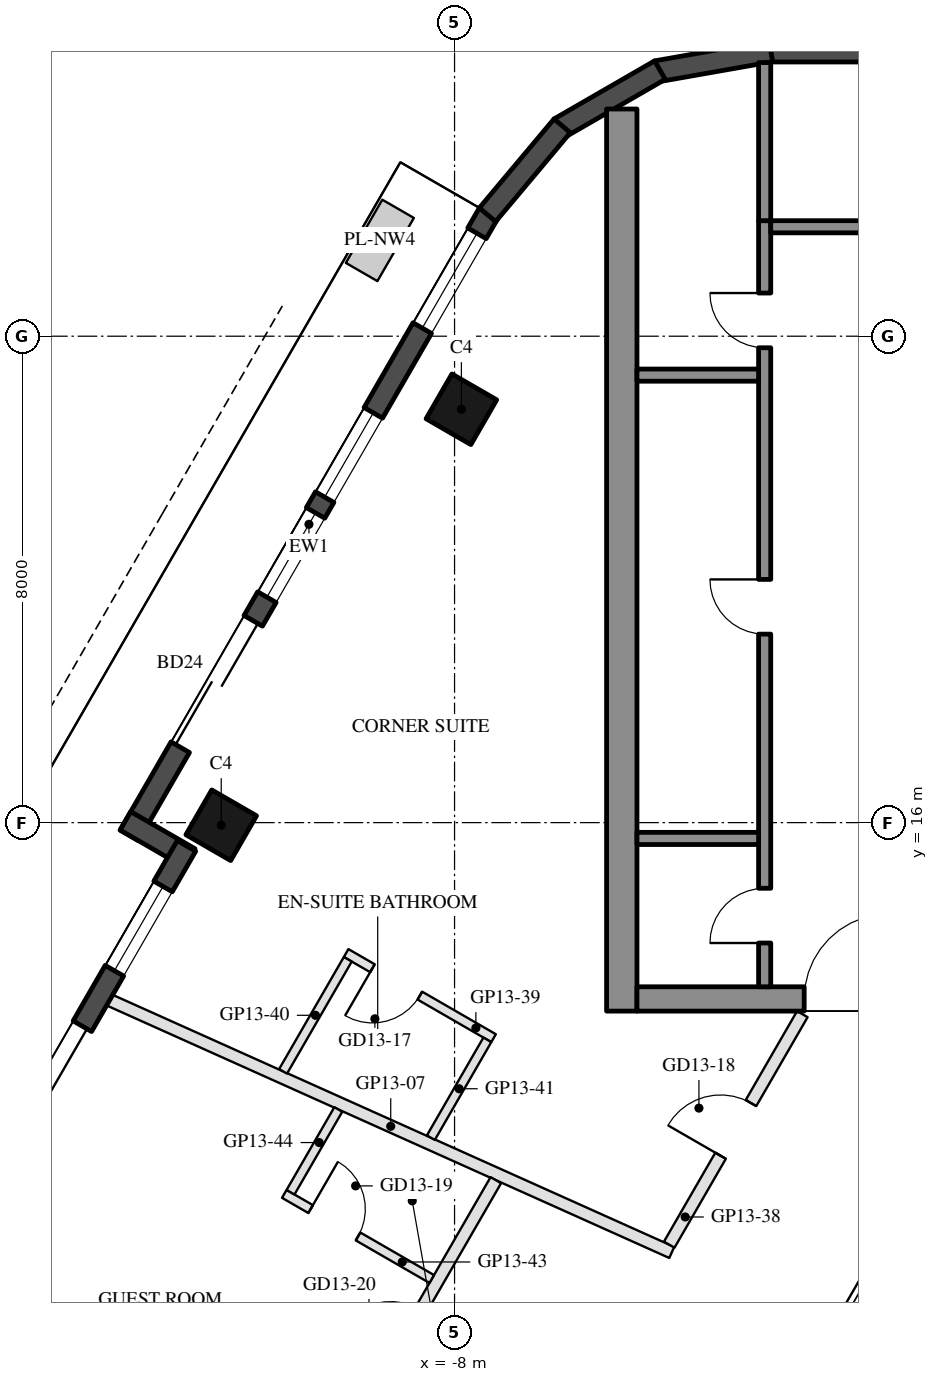
"""IFC4 building model, lengths in metres.
Left out: names, types, materials, properties, quantities, classifications, styles, units other than length and angle.
Written with IfcOpenShell. Run it as: python <this file> out.ifc"""

import sys

from ifc_helpers import new_model, si_unit, direction, frame, frame_2d, origin, origin_2d, place, context, subcontext, project, spatial, rectangle, hollow_rectangle, extrude, element, fill, save


model = new_model("IFC4")
c1 = context("Model", 3, precision=1e-05, world=origin(), true_north=direction((0.0, 1.0)))
c2 = subcontext(c1, "Body", "Model", "MODEL_VIEW")
j1 = project(units=[si_unit("LENGTHUNIT", "METRE"), si_unit("PLANEANGLEUNIT", "RADIAN")], contexts=[c1])
p1 = place(None, origin())
s1 = spatial("IfcSite", under=j1, at=p1, CompositionType="ELEMENT")
p2 = place(p1, origin())
s2 = spatial("IfcBuilding", under=s1, at=p2, CompositionType="ELEMENT")
p3 = place(p2, frame((0.0, 0.0, 154.0)))
s3 = spatial("IfcBuildingStorey", under=s2, at=p3, CompositionType="ELEMENT", Elevation=154.0)
for number, where, z_axis, x_axis in (
    (1, (-7.888, 22.798, 0.0), (0.0, 0.0, 1.0), (0.5, 0.866, 0.0)),
    (2, (-11.838, 15.957, 0.0), (0.0, 0.0, 1.0), (0.5, 0.866, 0.0)),
):
    element("IfcColumn", number, at=place(p3, frame(where, z_axis=z_axis, x_axis=x_axis)), inside=s3, PredefinedType="COLUMN", context=c2, shape_type="SweptSolid", body=[
        extrude(hollow_rectangle(XDim=0.85, YDim=0.85, WallThickness=0.04, at=origin_2d()), origin(), (0.0, 0.0, 1.0), 3.7),
    ])
p4 = place(p3, frame((-7.441, 26.022, 0.0), z_axis=(0.0, 0.0, 1.0), x_axis=(-0.499992533062, -0.86602971478, 0.0)))
e3 = element("IfcWall", 3, at=p4, inside=s3, PredefinedType="SOLIDWALL", context=c2, shape_type="SweptSolid", body=[
    extrude(rectangle(XDim=11.816, YDim=0.35, at=frame_2d((5.908, 0.0))), origin(), (0.0, 0.0, 1.0), 3.55),
])
p5 = place(p4, frame((0.381, 0.0, 0.3)))
e4 = element("IfcOpeningElement", 4, at=p5, cuts=e3, PredefinedType="OPENING", context=c2, shape_type="SweptSolid", body=[
    extrude(rectangle(XDim=1.8, YDim=2.65, at=frame_2d((0.9, 1.325))), frame((0.0, 0.185, 0.0), z_axis=(0.0, -1.0, 0.0), x_axis=(1.0, 0.0, 0.0)), (0.0, 0.0, 1.0), 0.37),
])
p6 = place(p4, frame((7.74, 0.0, 0.0)))
e5 = element("IfcOpeningElement", 5, at=p6, cuts=e3, PredefinedType="OPENING", context=c2, shape_type="SweptSolid", body=[
    extrude(rectangle(XDim=2.4, YDim=2.4, at=frame_2d((1.2, 1.2))), frame((0.0, 0.185, 0.0), z_axis=(0.0, -1.0, 0.0), x_axis=(1.0, 0.0, 0.0)), (0.0, 0.0, 1.0), 0.37),
])
p7 = place(p4, frame((3.791, 0.0, 0.3)))
e6 = element("IfcOpeningElement", 6, at=p7, cuts=e3, PredefinedType="OPENING", context=c2, shape_type="SweptSolid", body=[
    extrude(rectangle(XDim=1.6, YDim=2.65, at=frame_2d((0.8, 1.325))), frame((0.0, 0.185, 0.0), z_axis=(0.0, -1.0, 0.0), x_axis=(1.0, 0.0, 0.0)), (0.0, 0.0, 1.0), 0.37),
])
p8 = place(p4, frame((5.691, 0.0, 0.3)))
e7 = element("IfcOpeningElement", 7, at=p8, cuts=e3, PredefinedType="OPENING", context=c2, shape_type="SweptSolid", body=[
    extrude(rectangle(XDim=1.6, YDim=2.65, at=frame_2d((0.8, 1.325))), frame((0.0, 0.185, 0.0), z_axis=(0.0, -1.0, 0.0), x_axis=(1.0, 0.0, 0.0)), (0.0, 0.0, 1.0), 0.37),
])
p9 = place(p3, frame((-13.413, 16.029, 0.0), z_axis=(0.0, 0.0, 1.0), x_axis=(0.866005645448, -0.500034220881, 0.0)))
e8 = element("IfcWall", 8, at=p9, inside=s3, PredefinedType="SOLIDWALL", context=c2, shape_type="SweptSolid", body=[
    extrude(rectangle(XDim=1.22, YDim=0.35, at=frame_2d((0.61, 0.0))), origin(), (0.0, 0.0, 1.0), 3.55),
])
p10 = place(p3, frame((-12.409, 15.617, 0.0), z_axis=(0.0, 0.0, 1.0), x_axis=(-0.500003597184, -0.866023326939, 0.0)))
e9 = element("IfcWall", 9, at=p10, inside=s3, PredefinedType="SOLIDWALL", context=c2, shape_type="SweptSolid", body=[
    extrude(rectangle(XDim=6.74, YDim=0.35, at=frame_2d((3.37, 0.0))), origin(), (0.0, 0.0, 1.0), 3.55),
])
p11 = place(p10, frame((0.77, 0.0, 0.3)))
e10 = element("IfcOpeningElement", 10, at=p11, cuts=e9, PredefinedType="OPENING", context=c2, shape_type="SweptSolid", body=[
    extrude(rectangle(XDim=1.6, YDim=2.65, at=frame_2d((0.8, 1.325))), frame((0.0, 0.185, 0.0), z_axis=(0.0, -1.0, 0.0), x_axis=(1.0, 0.0, 0.0)), (0.0, 0.0, 1.0), 0.37),
])
p12 = place(p10, frame((3.424, 0.0, 0.0)))
e11 = element("IfcOpeningElement", 11, at=p12, cuts=e9, PredefinedType="OPENING", context=c2, shape_type="SweptSolid", body=[
    extrude(rectangle(XDim=2.4, YDim=2.4, at=frame_2d((1.2, 1.2))), frame((0.0, 0.185, 0.0), z_axis=(0.0, -1.0, 0.0), x_axis=(1.0, 0.0, 0.0)), (0.0, 0.0, 1.0), 0.37),
])
p13 = place(p3, frame((2.829, 28.685, 0.0), z_axis=(0.0, 0.0, 1.0), x_axis=(-1.0, 0.0, 0.0)))
e12 = element("IfcWall", 12, at=p13, inside=s3, PredefinedType="SOLIDWALL", context=c2, shape_type="SweptSolid", body=[
    extrude(rectangle(XDim=5.658, YDim=0.35, at=frame_2d((2.829, 0.0))), origin(), (0.0, 0.0, 1.0), 3.55),
])
for number, where, z_axis, x_axis in (
    (13, (-2.799, 28.688, 0.0), (0.0, 0.0, 1.0), (-0.985, -0.174, 0.0)),
    (14, (-4.623, 28.377, 0.0), (0.0, 0.0, 1.0), (-0.866, -0.5, 0.0)),
):
    element("IfcWall", number, at=place(p3, frame(where, z_axis=z_axis, x_axis=x_axis)), inside=s3, PredefinedType="SOLIDWALL", context=c2, shape_type="SweptSolid", body=[
        extrude(rectangle(XDim=1.91, YDim=0.35, at=frame_2d((0.955, 0.0))), origin(), (0.0, 0.0, 1.0), 3.55),
    ])
p14 = place(p3, frame((-6.23, 27.461, 0.0), z_axis=(0.0, 0.0, 1.0), x_axis=(-0.642808304945, -0.766027077259, 0.0)))
e15 = element("IfcWall", 15, at=p14, inside=s3, PredefinedType="SOLIDWALL", context=c2, shape_type="SweptSolid", body=[
    extrude(rectangle(XDim=1.91, YDim=0.35, at=frame_2d((0.955, 0.0))), origin(), (0.0, 0.0, 1.0), 3.55),
])
p15 = place(p3, frame((-5.25, 12.9, 0.0), z_axis=(0.0, 0.0, 1.0), x_axis=(0.0, 1.0, 0.0)))
e16 = element("IfcWall", 16, at=p15, inside=s3, PredefinedType="SHEAR", context=c2, shape_type="SweptSolid", body=[
    extrude(rectangle(XDim=14.837, YDim=0.5, at=frame_2d((7.418, 0.0))), origin(), (0.0, 0.0, 1.0), 3.5),
])
p16 = place(p3, frame((5.0, 13.1, 0.0), z_axis=(0.0, 0.0, 1.0), x_axis=(-1.0, 0.0, 0.0)))
e17 = element("IfcWall", 17, at=p16, inside=s3, PredefinedType="SHEAR", context=c2, shape_type="SweptSolid", body=[
    extrude(rectangle(XDim=10.0, YDim=0.4, at=frame_2d((5.0, 0.0))), origin(), (0.0, 0.0, 1.0), 3.5),
])
p17 = place(p16, frame((3.55, 0.0, 0.0)))
e18 = element("IfcOpeningElement", 18, at=p17, cuts=e17, PredefinedType="OPENING", context=c2, shape_type="SweptSolid", body=[
    extrude(rectangle(XDim=1.1, YDim=2.1, at=frame_2d((0.55, 1.05))), frame((0.0, 0.21, 0.0), z_axis=(0.0, -1.0, 0.0), x_axis=(1.0, 0.0, 0.0)), (0.0, 0.0, 1.0), 0.42),
])
p18 = place(p16, frame((5.85, 0.0, 0.0)))
e19 = element("IfcOpeningElement", 19, at=p18, cuts=e17, PredefinedType="OPENING", context=c2, shape_type="SweptSolid", body=[
    extrude(rectangle(XDim=1.4, YDim=2.1, at=frame_2d((0.7, 1.05))), frame((0.0, 0.21, 0.0), z_axis=(0.0, -1.0, 0.0), x_axis=(1.0, 0.0, 0.0)), (0.0, 0.0, 1.0), 0.42),
])
p19 = place(p3, frame((-2.9, 13.3, 0.0), z_axis=(0.0, 0.0, 1.0), x_axis=(0.0, 1.0, 0.0)))
e20 = element("IfcWall", 20, at=p19, inside=s3, PredefinedType="SHEAR", context=c2, shape_type="SweptSolid", body=[
    extrude(rectangle(XDim=12.6, YDim=0.2, at=frame_2d((6.3, 0.0))), origin(), (0.0, 0.0, 1.0), 3.5),
])
p20 = place(p19, frame((0.72, 0.0, 0.0)))
e21 = element("IfcOpeningElement", 21, at=p20, cuts=e20, PredefinedType="OPENING", context=c2, shape_type="SweptSolid", body=[
    extrude(rectangle(XDim=0.9, YDim=2.1, at=frame_2d((0.45, 1.05))), frame((0.0, 0.11, 0.0), z_axis=(0.0, -1.0, 0.0), x_axis=(1.0, 0.0, 0.0)), (0.0, 0.0, 1.0), 0.22),
])
p21 = place(p19, frame((5.8, 0.0, 0.0)))
e22 = element("IfcOpeningElement", 22, at=p21, cuts=e20, PredefinedType="OPENING", context=c2, shape_type="SweptSolid", body=[
    extrude(rectangle(XDim=0.9, YDim=2.1, at=frame_2d((0.45, 1.05))), frame((0.0, 0.11, 0.0), z_axis=(0.0, -1.0, 0.0), x_axis=(1.0, 0.0, 0.0)), (0.0, 0.0, 1.0), 0.22),
])
p22 = place(p19, frame((10.51, 0.0, 0.0)))
e23 = element("IfcOpeningElement", 23, at=p22, cuts=e20, PredefinedType="OPENING", context=c2, shape_type="SweptSolid", body=[
    extrude(rectangle(XDim=0.9, YDim=2.1, at=frame_2d((0.45, 1.05))), frame((0.0, 0.11, 0.0), z_axis=(0.0, -1.0, 0.0), x_axis=(1.0, 0.0, 0.0)), (0.0, 0.0, 1.0), 0.22),
])
p23 = place(p3, frame((-0.4, 25.8, 0.0), z_axis=(0.0, 0.0, 1.0), x_axis=(-1.0, 0.0, 0.0)))
e24 = element("IfcWall", 24, at=p23, inside=s3, PredefinedType="SHEAR", context=c2, shape_type="SweptSolid", body=[
    extrude(rectangle(XDim=2.4, YDim=0.2, at=frame_2d((1.2, 0.0))), origin(), (0.0, 0.0, 1.0), 3.5),
])
for number, where, z_axis, x_axis in (
    (25, (-3.0, 15.74, 0.0), (0.0, 0.0, 1.0), (-1.0, 0.0, 0.0)),
    (26, (-3.0, 23.36, 0.0), (0.0, 0.0, 1.0), (-1.0, 0.0, 0.0)),
):
    element("IfcWall", number, at=place(p3, frame(where, z_axis=z_axis, x_axis=x_axis)), inside=s3, PredefinedType="SHEAR", context=c2, shape_type="SweptSolid", body=[
        extrude(rectangle(XDim=2.0, YDim=0.2, at=frame_2d((1.0, 0.0))), origin(), (0.0, 0.0, 1.0), 3.5),
    ])
p24 = place(p3, frame((-2.9, 25.9, 0.0), z_axis=(0.0, 0.0, 1.0), x_axis=(0.0, 1.0, 0.0)))
e27 = element("IfcWall", 27, at=p24, inside=s3, PredefinedType="SHEAR", context=c2, shape_type="SweptSolid", body=[
    extrude(rectangle(XDim=2.6, YDim=0.2, at=frame_2d((1.3, 0.0))), origin(), (0.0, 0.0, 1.0), 3.5),
])
p25 = place(p3, frame((-13.672, 13.08, 0.0), z_axis=(0.0, 0.0, 1.0), x_axis=(0.912311972773, -0.409495866077, 0.0)))
e28 = element("IfcWall", 28, at=p25, inside=s3, PredefinedType="PARTITIONING", context=c2, shape_type="SweptSolid", body=[
    extrude(rectangle(XDim=10.132, YDim=0.2, at=frame_2d((5.066, 0.0))), origin(), (0.0, 0.0, 1.0), 3.06),
])
p26 = place(p3, frame((-4.469, 9.059, 0.0), z_axis=(0.0, 0.0, 1.0), x_axis=(0.499996027077, 0.86602769754, 0.0)))
e29 = element("IfcWall", 29, at=p26, inside=s3, PredefinedType="PARTITIONING", context=c2, shape_type="SweptSolid", body=[
    extrude(rectangle(XDim=4.377, YDim=0.2, at=frame_2d((2.189, 0.0))), origin(), (0.0, 0.0, 1.0), 2.95),
])
p27 = place(p26, frame((1.689, 0.0, 0.0)))
e30 = element("IfcOpeningElement", 30, at=p27, cuts=e29, PredefinedType="OPENING", context=c2, shape_type="SweptSolid", body=[
    extrude(rectangle(XDim=1.0, YDim=2.1, at=frame_2d((0.5, 1.05))), frame((0.0, 0.11, 0.0), z_axis=(0.0, -1.0, 0.0), x_axis=(1.0, 0.0, 0.0)), (0.0, 0.0, 1.0), 0.22),
])
p28 = place(p3, frame((-7.358, 12.455, 0.0), z_axis=(0.0, 0.0, 1.0), x_axis=(-0.866034573852, 0.49998411664, 0.0)))
e31 = element("IfcWall", 31, at=p28, inside=s3, PredefinedType="PARTITIONING", context=c2, shape_type="SweptSolid", body=[
    extrude(rectangle(XDim=2.8, YDim=0.15, at=frame_2d((1.4, 0.0))), origin(), (0.0, 0.0, 1.0), 3.55),
])
p29 = place(p28, frame((1.4, 0.0, 0.0)))
e32 = element("IfcOpeningElement", 32, at=p29, cuts=e31, PredefinedType="OPENING", context=c2, shape_type="SweptSolid", body=[
    extrude(rectangle(XDim=0.9, YDim=2.1, at=frame_2d((0.45, 1.05))), frame((0.0, 0.085, 0.0), z_axis=(0.0, -1.0, 0.0), x_axis=(1.0, 0.0, 0.0)), (0.0, 0.0, 1.0), 0.17),
])
p30 = place(p3, frame((-9.756, 13.752, 0.0), z_axis=(0.0, 0.0, 1.0), x_axis=(-0.50001378257, -0.866017446268, 0.0)))
e33 = element("IfcWall", 33, at=p30, inside=s3, PredefinedType="PARTITIONING", context=c2, shape_type="SweptSolid", body=[
    extrude(rectangle(XDim=2.128, YDim=0.15, at=frame_2d((1.064, 0.0))), origin(), (0.0, 0.0, 1.0), 3.55),
])
p31 = place(p3, frame((-7.461, 12.427, 0.0), z_axis=(0.0, 0.0, 1.0), x_axis=(-0.500025795397, -0.866010510293, 0.0)))
e34 = element("IfcWall", 34, at=p31, inside=s3, PredefinedType="PARTITIONING", context=c2, shape_type="SweptSolid", body=[
    extrude(rectangle(XDim=1.858, YDim=0.15, at=frame_2d((0.929, 0.0))), origin(), (0.0, 0.0, 1.0), 3.55),
])
p32 = place(p3, frame((-10.811, 4.075, 0.0), z_axis=(0.0, 0.0, 1.0), x_axis=(0.500006032813, 0.86602192071, 0.0)))
e35 = element("IfcWall", 35, at=p32, inside=s3, PredefinedType="PARTITIONING", context=c2, shape_type="SweptSolid", body=[
    extrude(rectangle(XDim=6.98, YDim=0.2, at=frame_2d((3.49, 0.0))), origin(), (0.0, 0.0, 1.0), 2.95),
])
p33 = place(p32, frame((3.52, 0.0, 0.0)))
e36 = element("IfcOpeningElement", 36, at=p33, cuts=e35, PredefinedType="OPENING", context=c2, shape_type="SweptSolid", body=[
    extrude(rectangle(XDim=1.0, YDim=2.1, at=frame_2d((0.5, 1.05))), frame((0.0, 0.11, 0.0), z_axis=(0.0, -1.0, 0.0), x_axis=(1.0, 0.0, 0.0)), (0.0, 0.0, 1.0), 0.22),
])
p34 = place(p3, frame((-10.8, 9.894, 0.0), z_axis=(0.0, 0.0, 1.0), x_axis=(0.866056369097, -0.49994636267, 0.0)))
e37 = element("IfcWall", 37, at=p34, inside=s3, PredefinedType="PARTITIONING", context=c2, shape_type="SweptSolid", body=[
    extrude(rectangle(XDim=2.8, YDim=0.15, at=frame_2d((1.4, 0.0))), origin(), (0.0, 0.0, 1.0), 3.55),
])
p35 = place(p34, frame((0.5, 0.0, 0.0)))
e38 = element("IfcOpeningElement", 38, at=p35, cuts=e37, PredefinedType="OPENING", context=c2, shape_type="SweptSolid", body=[
    extrude(rectangle(XDim=0.9, YDim=2.1, at=frame_2d((0.45, 1.05))), frame((0.0, 0.085, 0.0), z_axis=(0.0, -1.0, 0.0), x_axis=(1.0, 0.0, 0.0)), (0.0, 0.0, 1.0), 0.17),
])
p36 = place(p3, frame((-9.912, 11.283, 0.0), z_axis=(0.0, 0.0, 1.0), x_axis=(-0.499964459118, -0.86604592235, 0.0)))
e39 = element("IfcWall", 39, at=p36, inside=s3, PredefinedType="PARTITIONING", context=c2, shape_type="SweptSolid", body=[
    extrude(rectangle(XDim=1.572, YDim=0.15, at=frame_2d((0.786, 0.0))), origin(), (0.0, 0.0, 1.0), 2.95),
])
p37 = place(p5, origin())
e40 = element("IfcWindow", 40, at=p37, inside=s3, PartitioningType="SINGLE_PANEL", PredefinedType="WINDOW", context=c2, shape_type="SweptSolid", body=[
    extrude(rectangle(XDim=1.8, YDim=2.65, at=frame_2d((0.9, 1.325))), frame((0.0, 0.03, 0.0), z_axis=(0.0, -1.0, 0.0), x_axis=(1.0, 0.0, 0.0)), (0.0, 0.0, 1.0), 0.06),
])
fill(e4, e40)
p38 = place(p6, frame((2.4, 0.0, 0.0), z_axis=(0.0, 0.0, 1.0), x_axis=(-1.0, 0.0, 0.0)))
e41 = element("IfcDoor", 41, at=p38, inside=s3, OperationType="SLIDING_TO_LEFT", PredefinedType="DOOR", context=c2, shape_type="SweptSolid", body=[
    extrude(rectangle(XDim=2.4, YDim=2.4, at=frame_2d((1.2, 1.2))), frame((0.0, 0.025, 0.0), z_axis=(0.0, -1.0, 0.0), x_axis=(1.0, 0.0, 0.0)), (0.0, 0.0, 1.0), 0.05),
])
fill(e5, e41)
p39 = place(p7, origin())
e42 = element("IfcWindow", 42, at=p39, inside=s3, PartitioningType="SINGLE_PANEL", PredefinedType="WINDOW", context=c2, shape_type="SweptSolid", body=[
    extrude(rectangle(XDim=1.6, YDim=2.65, at=frame_2d((0.8, 1.325))), frame((0.0, 0.03, 0.0), z_axis=(0.0, -1.0, 0.0), x_axis=(1.0, 0.0, 0.0)), (0.0, 0.0, 1.0), 0.06),
])
fill(e6, e42)
p40 = place(p8, origin())
e43 = element("IfcWindow", 43, at=p40, inside=s3, PartitioningType="SINGLE_PANEL", PredefinedType="WINDOW", context=c2, shape_type="SweptSolid", body=[
    extrude(rectangle(XDim=1.6, YDim=2.65, at=frame_2d((0.8, 1.325))), frame((0.0, 0.03, 0.0), z_axis=(0.0, -1.0, 0.0), x_axis=(1.0, 0.0, 0.0)), (0.0, 0.0, 1.0), 0.06),
])
fill(e7, e43)
p41 = place(p11, origin())
e44 = element("IfcWindow", 44, at=p41, inside=s3, PartitioningType="SINGLE_PANEL", PredefinedType="WINDOW", context=c2, shape_type="SweptSolid", body=[
    extrude(rectangle(XDim=1.6, YDim=2.65, at=frame_2d((0.8, 1.325))), frame((0.0, 0.03, 0.0), z_axis=(0.0, -1.0, 0.0), x_axis=(1.0, 0.0, 0.0)), (0.0, 0.0, 1.0), 0.06),
])
fill(e10, e44)
p42 = place(p12, frame((2.4, 0.0, 0.0), z_axis=(0.0, 0.0, 1.0), x_axis=(-1.0, 0.0, 0.0)))
e45 = element("IfcDoor", 45, at=p42, inside=s3, OperationType="SLIDING_TO_LEFT", PredefinedType="DOOR", context=c2, shape_type="SweptSolid", body=[
    extrude(rectangle(XDim=2.4, YDim=2.4, at=frame_2d((1.2, 1.2))), frame((0.0, 0.025, 0.0), z_axis=(0.0, -1.0, 0.0), x_axis=(1.0, 0.0, 0.0)), (0.0, 0.0, 1.0), 0.05),
])
fill(e11, e45)
p43 = place(p20, origin())
e46 = element("IfcDoor", 46, at=p43, inside=s3, OperationType="SINGLE_SWING_LEFT", PredefinedType="DOOR", context=c2, shape_type="SweptSolid", body=[
    extrude(rectangle(XDim=0.9, YDim=2.1, at=frame_2d((0.45, 1.05))), frame((0.0, 0.025, 0.0), z_axis=(0.0, -1.0, 0.0), x_axis=(1.0, 0.0, 0.0)), (0.0, 0.0, 1.0), 0.05),
])
fill(e21, e46)
p44 = place(p21, origin())
e47 = element("IfcDoor", 47, at=p44, inside=s3, OperationType="SINGLE_SWING_RIGHT", PredefinedType="DOOR", context=c2, shape_type="SweptSolid", body=[
    extrude(rectangle(XDim=0.9, YDim=2.1, at=frame_2d((0.45, 1.05))), frame((0.0, 0.025, 0.0), z_axis=(0.0, -1.0, 0.0), x_axis=(1.0, 0.0, 0.0)), (0.0, 0.0, 1.0), 0.05),
])
fill(e22, e47)
p45 = place(p22, origin())
e48 = element("IfcDoor", 48, at=p45, inside=s3, OperationType="SINGLE_SWING_RIGHT", PredefinedType="DOOR", context=c2, shape_type="SweptSolid", body=[
    extrude(rectangle(XDim=0.9, YDim=2.1, at=frame_2d((0.45, 1.05))), frame((0.0, 0.025, 0.0), z_axis=(0.0, -1.0, 0.0), x_axis=(1.0, 0.0, 0.0)), (0.0, 0.0, 1.0), 0.05),
])
fill(e23, e48)
p46 = place(p18, frame((1.4, 0.0, 0.0), z_axis=(0.0, 0.0, 1.0), x_axis=(-1.0, 0.0, 0.0)))
e49 = element("IfcDoor", 49, at=p46, inside=s3, OperationType="DOUBLE_DOOR_SINGLE_SWING", PredefinedType="DOOR", context=c2, shape_type="SweptSolid", body=[
    extrude(rectangle(XDim=1.4, YDim=2.1, at=frame_2d((0.7, 1.05))), frame((0.0, 0.025, 0.0), z_axis=(0.0, -1.0, 0.0), x_axis=(1.0, 0.0, 0.0)), (0.0, 0.0, 1.0), 0.05),
])
fill(e19, e49)
p47 = place(p29, origin())
e50 = element("IfcDoor", 50, at=p47, inside=s3, OperationType="SINGLE_SWING_RIGHT", PredefinedType="DOOR", context=c2, shape_type="SweptSolid", body=[
    extrude(rectangle(XDim=0.9, YDim=2.1, at=frame_2d((0.45, 1.05))), frame((0.0, 0.025, 0.0), z_axis=(0.0, -1.0, 0.0), x_axis=(1.0, 0.0, 0.0)), (0.0, 0.0, 1.0), 0.05),
])
fill(e32, e50)
p48 = place(p27, origin())
e51 = element("IfcDoor", 51, at=p48, inside=s3, OperationType="SINGLE_SWING_LEFT", PredefinedType="DOOR", context=c2, shape_type="SweptSolid", body=[
    extrude(rectangle(XDim=1.0, YDim=2.1, at=frame_2d((0.5, 1.05))), frame((0.0, 0.025, 0.0), z_axis=(0.0, -1.0, 0.0), x_axis=(1.0, 0.0, 0.0)), (0.0, 0.0, 1.0), 0.05),
])
fill(e30, e51)
p49 = place(p35, origin())
e52 = element("IfcDoor", 52, at=p49, inside=s3, OperationType="SINGLE_SWING_LEFT", PredefinedType="DOOR", context=c2, shape_type="SweptSolid", body=[
    extrude(rectangle(XDim=0.9, YDim=2.1, at=frame_2d((0.45, 1.05))), frame((0.0, 0.025, 0.0), z_axis=(0.0, -1.0, 0.0), x_axis=(1.0, 0.0, 0.0)), (0.0, 0.0, 1.0), 0.05),
])
fill(e38, e52)
save(model, sys.argv[1])
